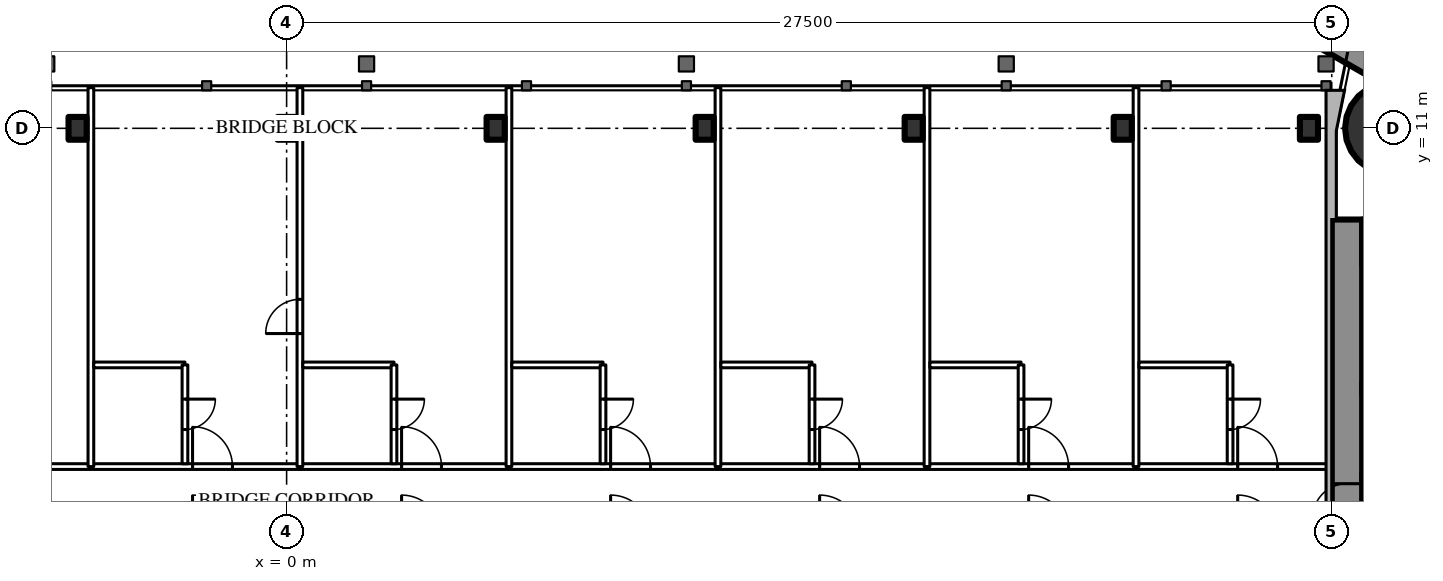
"""IFC4 building model, lengths in metres.
Left out: names, types, materials, properties, quantities, classifications, styles, units other than length and angle.
Written with IfcOpenShell. Run it as: python <this file> out.ifc"""

import sys

from ifc_helpers import new_model, si_unit, direction, frame, frame_2d, origin, origin_2d, place, context, subcontext, project, spatial, rectangle, circle, i_section, extrude, element, fill, save


model = new_model("IFC4")
c1 = context("Model", 3, precision=1e-05, world=origin(), true_north=direction((0.0, 1.0)))
c2 = subcontext(c1, "Body", "Model", "MODEL_VIEW")
j1 = project(units=[si_unit("LENGTHUNIT", "METRE"), si_unit("PLANEANGLEUNIT", "RADIAN")], contexts=[c1])
p1 = place(None, origin())
s1 = spatial("IfcSite", under=j1, at=p1, CompositionType="ELEMENT")
p2 = place(p1, origin())
s2 = spatial("IfcBuilding", under=s1, at=p2, CompositionType="ELEMENT")
p3 = place(p2, frame((0.0, 0.0, 222.5)))
s3 = spatial("IfcBuildingStorey", under=s2, at=p3, CompositionType="ELEMENT", Elevation=222.5)
p4 = place(p3, frame((29.05, 11.0, 0.0), z_axis=(0.0, 0.0, 1.0), x_axis=(1.0, 0.0, 0.0)))
e1 = element("IfcColumn", 1, at=p4, inside=s3, PredefinedType="COLUMN", context=c2, shape_type="SweptSolid", body=[
    extrude(circle(Radius=1.2, at=origin_2d()), origin(), (0.0, 0.0, 1.0), 3.6),
])
p5 = place(p3, frame((27.9, -8.6, 0.0), z_axis=(0.0, 0.0, 1.0), x_axis=(0.0, 1.0, 0.0)))
e2 = element("IfcWall", 2, at=p5, inside=s3, PredefinedType="SHEAR", context=c2, shape_type="SweptSolid", body=[
    extrude(rectangle(XDim=17.2, YDim=0.8, at=frame_2d((8.6, 0.0))), origin(), (0.0, 0.0, 1.0), 3.6),
])
p6 = place(p5, frame((9.35, 0.0, 0.0)))
e3 = element("IfcOpeningElement", 3, at=p6, cuts=e2, PredefinedType="OPENING", context=c2, shape_type="SweptSolid", body=[
    extrude(rectangle(XDim=0.9, YDim=2.2, at=frame_2d((0.45, 1.1))), frame((0.0, 0.41, 0.0), z_axis=(0.0, -1.0, 0.0), x_axis=(1.0, 0.0, 0.0)), (0.0, 0.0, 1.0), 0.82),
])
p7 = place(p3, frame((28.3, 8.0, 0.0), z_axis=(0.0, 0.0, 1.0), x_axis=(1.0, 0.0, 0.0)))
e4 = element("IfcWall", 4, at=p7, inside=s3, PredefinedType="SHEAR", context=c2, shape_type="SweptSolid", body=[
    extrude(rectangle(XDim=8.4, YDim=1.2, at=frame_2d((4.2, 0.0))), origin(), (0.0, 0.0, 1.0), 3.6),
])
p8 = place(p7, frame((0.25, 0.0, 0.0)))
e5 = element("IfcOpeningElement", 5, at=p8, cuts=e4, PredefinedType="OPENING", context=c2, shape_type="SweptSolid", body=[
    extrude(rectangle(XDim=1.0, YDim=2.2, at=frame_2d((0.5, 1.1))), frame((0.0, 0.61, 0.0), z_axis=(0.0, -1.0, 0.0), x_axis=(1.0, 0.0, 0.0)), (0.0, 0.0, 1.0), 1.22),
])
p9 = place(p3, frame((28.3, 4.15, 0.0), z_axis=(0.0, 0.0, 1.0), x_axis=(1.0, 0.0, 0.0)))
e6 = element("IfcWall", 6, at=p9, inside=s3, PredefinedType="SHEAR", context=c2, shape_type="SweptSolid", body=[
    extrude(rectangle(XDim=8.4, YDim=0.3, at=frame_2d((4.2, 0.0))), origin(), (0.0, 0.0, 1.0), 3.6),
])
p10 = place(p3, frame((28.3, 1.775, 0.0), z_axis=(0.0, 0.0, 1.0), x_axis=(1.0, 0.0, 0.0)))
e7 = element("IfcWall", 7, at=p10, inside=s3, PredefinedType="SHEAR", context=c2, shape_type="SweptSolid", body=[
    extrude(rectangle(XDim=2.9, YDim=0.25, at=frame_2d((1.45, 0.0))), origin(), (0.0, 0.0, 1.0), 3.6),
])
p11 = place(p3, frame((27.2, 13.8, 0.0), z_axis=(0.0, 0.0, 1.0), x_axis=(0.866024515034, -0.500001539357, 0.0)))
e8 = element("IfcWall", 8, at=p11, inside=s3, PredefinedType="SHEAR", context=c2, shape_type="SweptSolid", body=[
    extrude(rectangle(XDim=26.907, YDim=1.2, at=frame_2d((13.454, 0.0))), origin(), (0.0, 0.0, 1.0), 3.6),
])
p12 = place(p11, frame((4.6, 0.0, 0.0)))
e9 = element("IfcOpeningElement", 9, at=p12, cuts=e8, PredefinedType="OPENING", context=c2, shape_type="SweptSolid", body=[
    extrude(rectangle(XDim=1.0, YDim=2.2, at=frame_2d((0.5, 1.1))), frame((0.0, 0.61, 0.0), z_axis=(0.0, -1.0, 0.0), x_axis=(1.0, 0.0, 0.0)), (0.0, 0.0, 1.0), 1.22),
])
p13 = place(p11, frame((13.395, 0.0, 0.0)))
e10 = element("IfcOpeningElement", 10, at=p13, cuts=e8, PredefinedType="OPENING", context=c2, shape_type="SweptSolid", body=[
    extrude(rectangle(XDim=1.8, YDim=2.2, at=frame_2d((0.9, 1.1))), frame((0.0, 0.61, 0.0), z_axis=(0.0, -1.0, 0.0), x_axis=(1.0, 0.0, 0.0)), (0.0, 0.0, 1.0), 1.22),
])
for number, where, z_axis, x_axis in (
    (11, (-5.5, 11.0, 0.0), (0.0, 0.0, 1.0), (1.0, 0.0, 0.0)),
    (12, (0.0, 11.0, 0.0), (0.0, 0.0, 1.0), (1.0, 0.0, 0.0)),
    (13, (5.5, 11.0, 0.0), (0.0, 0.0, 1.0), (1.0, 0.0, 0.0)),
    (14, (11.0, 11.0, 0.0), (0.0, 0.0, 1.0), (1.0, 0.0, 0.0)),
    (15, (16.5, 11.0, 0.0), (0.0, 0.0, 1.0), (1.0, 0.0, 0.0)),
    (16, (22.0, 11.0, 0.0), (0.0, 0.0, 1.0), (1.0, 0.0, 0.0)),
    (17, (26.9, 11.0, 0.0), (0.0, 0.0, 1.0), (1.0, 0.0, 0.0)),
):
    element("IfcColumn", number, at=place(p3, frame(where, z_axis=z_axis, x_axis=x_axis)), inside=s3, PredefinedType="COLUMN", context=c2, shape_type="SweptSolid", body=[
        extrude(i_section(OverallWidth=0.476, OverallDepth=0.6, WebThickness=0.1, FlangeThickness=0.14, FilletRadius=0.02, at=origin_2d()), origin(), (0.0, 0.0, 1.0), 3.6),
    ])
p14 = place(p3, frame((-27.5, 2.1, 0.0), z_axis=(0.0, 0.0, 1.0), x_axis=(1.0, 0.0, 0.0)))
e18 = element("IfcWall", 18, at=p14, inside=s3, PredefinedType="PARTITIONING", context=c2, shape_type="SweptSolid", body=[
    extrude(rectangle(XDim=55.0, YDim=0.15, at=frame_2d((27.5, 0.0))), origin(), (0.0, 0.0, 1.0), 3.4),
])
p15 = place(p14, frame((2.025, 0.0, 0.0)))
e19 = element("IfcOpeningElement", 19, at=p15, cuts=e18, PredefinedType="OPENING", context=c2, shape_type="SweptSolid", body=[
    extrude(rectangle(XDim=1.05, YDim=2.4, at=frame_2d((0.525, 1.2))), frame((0.0, 0.085, 0.0), z_axis=(0.0, -1.0, 0.0), x_axis=(1.0, 0.0, 0.0)), (0.0, 0.0, 1.0), 0.17),
])
p16 = place(p14, frame((8.525, 0.0, 0.0)))
e20 = element("IfcOpeningElement", 20, at=p16, cuts=e18, PredefinedType="OPENING", context=c2, shape_type="SweptSolid", body=[
    extrude(rectangle(XDim=1.05, YDim=2.4, at=frame_2d((0.525, 1.2))), frame((0.0, 0.085, 0.0), z_axis=(0.0, -1.0, 0.0), x_axis=(1.0, 0.0, 0.0)), (0.0, 0.0, 1.0), 0.17),
])
p17 = place(p14, frame((14.025, 0.0, 0.0)))
e21 = element("IfcOpeningElement", 21, at=p17, cuts=e18, PredefinedType="OPENING", context=c2, shape_type="SweptSolid", body=[
    extrude(rectangle(XDim=1.05, YDim=2.4, at=frame_2d((0.525, 1.2))), frame((0.0, 0.085, 0.0), z_axis=(0.0, -1.0, 0.0), x_axis=(1.0, 0.0, 0.0)), (0.0, 0.0, 1.0), 0.17),
])
p18 = place(p14, frame((19.525, 0.0, 0.0)))
e22 = element("IfcOpeningElement", 22, at=p18, cuts=e18, PredefinedType="OPENING", context=c2, shape_type="SweptSolid", body=[
    extrude(rectangle(XDim=1.05, YDim=2.4, at=frame_2d((0.525, 1.2))), frame((0.0, 0.085, 0.0), z_axis=(0.0, -1.0, 0.0), x_axis=(1.0, 0.0, 0.0)), (0.0, 0.0, 1.0), 0.17),
])
p19 = place(p14, frame((25.025, 0.0, 0.0)))
e23 = element("IfcOpeningElement", 23, at=p19, cuts=e18, PredefinedType="OPENING", context=c2, shape_type="SweptSolid", body=[
    extrude(rectangle(XDim=1.05, YDim=2.4, at=frame_2d((0.525, 1.2))), frame((0.0, 0.085, 0.0), z_axis=(0.0, -1.0, 0.0), x_axis=(1.0, 0.0, 0.0)), (0.0, 0.0, 1.0), 0.17),
])
p20 = place(p14, frame((30.525, 0.0, 0.0)))
e24 = element("IfcOpeningElement", 24, at=p20, cuts=e18, PredefinedType="OPENING", context=c2, shape_type="SweptSolid", body=[
    extrude(rectangle(XDim=1.05, YDim=2.4, at=frame_2d((0.525, 1.2))), frame((0.0, 0.085, 0.0), z_axis=(0.0, -1.0, 0.0), x_axis=(1.0, 0.0, 0.0)), (0.0, 0.0, 1.0), 0.17),
])
p21 = place(p14, frame((36.025, 0.0, 0.0)))
e25 = element("IfcOpeningElement", 25, at=p21, cuts=e18, PredefinedType="OPENING", context=c2, shape_type="SweptSolid", body=[
    extrude(rectangle(XDim=1.05, YDim=2.4, at=frame_2d((0.525, 1.2))), frame((0.0, 0.085, 0.0), z_axis=(0.0, -1.0, 0.0), x_axis=(1.0, 0.0, 0.0)), (0.0, 0.0, 1.0), 0.17),
])
p22 = place(p14, frame((41.525, 0.0, 0.0)))
e26 = element("IfcOpeningElement", 26, at=p22, cuts=e18, PredefinedType="OPENING", context=c2, shape_type="SweptSolid", body=[
    extrude(rectangle(XDim=1.05, YDim=2.4, at=frame_2d((0.525, 1.2))), frame((0.0, 0.085, 0.0), z_axis=(0.0, -1.0, 0.0), x_axis=(1.0, 0.0, 0.0)), (0.0, 0.0, 1.0), 0.17),
])
p23 = place(p14, frame((47.025, 0.0, 0.0)))
e27 = element("IfcOpeningElement", 27, at=p23, cuts=e18, PredefinedType="OPENING", context=c2, shape_type="SweptSolid", body=[
    extrude(rectangle(XDim=1.05, YDim=2.4, at=frame_2d((0.525, 1.2))), frame((0.0, 0.085, 0.0), z_axis=(0.0, -1.0, 0.0), x_axis=(1.0, 0.0, 0.0)), (0.0, 0.0, 1.0), 0.17),
])
p24 = place(p14, frame((52.525, 0.0, 0.0)))
e28 = element("IfcOpeningElement", 28, at=p24, cuts=e18, PredefinedType="OPENING", context=c2, shape_type="SweptSolid", body=[
    extrude(rectangle(XDim=1.05, YDim=2.4, at=frame_2d((0.525, 1.2))), frame((0.0, 0.085, 0.0), z_axis=(0.0, -1.0, 0.0), x_axis=(1.0, 0.0, 0.0)), (0.0, 0.0, 1.0), 0.17),
])
p25 = place(p3, frame((-5.15, 2.1, 0.0), z_axis=(0.0, 0.0, 1.0), x_axis=(0.0, 1.0, 0.0)))
e29 = element("IfcWall", 29, at=p25, inside=s3, PredefinedType="PARTITIONING", context=c2, shape_type="SweptSolid", body=[
    extrude(rectangle(XDim=9.97, YDim=0.15, at=frame_2d((4.985, 0.0))), origin(), (0.0, 0.0, 1.0), 3.4),
])
p26 = place(p3, frame((0.35, 2.1, 0.0), z_axis=(0.0, 0.0, 1.0), x_axis=(0.0, 1.0, 0.0)))
e30 = element("IfcWall", 30, at=p26, inside=s3, PredefinedType="PARTITIONING", context=c2, shape_type="SweptSolid", body=[
    extrude(rectangle(XDim=9.97, YDim=0.15, at=frame_2d((4.985, 0.0))), origin(), (0.0, 0.0, 1.0), 3.4),
])
p27 = place(p26, frame((3.5, 0.0, 0.0)))
e31 = element("IfcOpeningElement", 31, at=p27, cuts=e30, PredefinedType="OPENING", context=c2, shape_type="SweptSolid", body=[
    extrude(rectangle(XDim=0.9, YDim=2.2, at=frame_2d((0.45, 1.1))), frame((0.0, 0.085, 0.0), z_axis=(0.0, -1.0, 0.0), x_axis=(1.0, 0.0, 0.0)), (0.0, 0.0, 1.0), 0.17),
])
for number, where, z_axis, x_axis in (
    (32, (5.85, 2.1, 0.0), (0.0, 0.0, 1.0), (0.0, 1.0, 0.0)),
    (33, (11.35, 2.1, 0.0), (0.0, 0.0, 1.0), (0.0, 1.0, 0.0)),
    (34, (16.85, 2.1, 0.0), (0.0, 0.0, 1.0), (0.0, 1.0, 0.0)),
    (35, (22.35, 2.1, 0.0), (0.0, 0.0, 1.0), (0.0, 1.0, 0.0)),
):
    element("IfcWall", number, at=place(p3, frame(where, z_axis=z_axis, x_axis=x_axis)), inside=s3, PredefinedType="PARTITIONING", context=c2, shape_type="SweptSolid", body=[
        extrude(rectangle(XDim=9.97, YDim=0.15, at=frame_2d((4.985, 0.0))), origin(), (0.0, 0.0, 1.0), 3.4),
    ])
p28 = place(p3, frame((-5.075, 4.775, 0.0), z_axis=(0.0, 0.0, 1.0), x_axis=(1.0, 0.0, 0.0)))
e36 = element("IfcWall", 36, at=p28, inside=s3, PredefinedType="PARTITIONING", context=c2, shape_type="SweptSolid", body=[
    extrude(rectangle(XDim=2.4, YDim=0.15, at=frame_2d((1.2, 0.0))), origin(), (0.0, 0.0, 1.0), 3.4),
])
p29 = place(p3, frame((-2.675, 2.175, 0.0), z_axis=(0.0, 0.0, 1.0), x_axis=(0.0, 1.0, 0.0)))
e37 = element("IfcWall", 37, at=p29, inside=s3, PredefinedType="PARTITIONING", context=c2, shape_type="SweptSolid", body=[
    extrude(rectangle(XDim=2.6, YDim=0.15, at=frame_2d((1.3, 0.0))), origin(), (0.0, 0.0, 1.0), 3.4),
])
p30 = place(p29, frame((0.9, 0.0, 0.0)))
e38 = element("IfcOpeningElement", 38, at=p30, cuts=e37, PredefinedType="OPENING", context=c2, shape_type="SweptSolid", body=[
    extrude(rectangle(XDim=0.8, YDim=2.2, at=frame_2d((0.4, 1.1))), frame((0.0, 0.085, 0.0), z_axis=(0.0, -1.0, 0.0), x_axis=(1.0, 0.0, 0.0)), (0.0, 0.0, 1.0), 0.17),
])
p31 = place(p3, frame((0.425, 4.775, 0.0), z_axis=(0.0, 0.0, 1.0), x_axis=(1.0, 0.0, 0.0)))
e39 = element("IfcWall", 39, at=p31, inside=s3, PredefinedType="PARTITIONING", context=c2, shape_type="SweptSolid", body=[
    extrude(rectangle(XDim=2.4, YDim=0.15, at=frame_2d((1.2, 0.0))), origin(), (0.0, 0.0, 1.0), 3.4),
])
p32 = place(p3, frame((2.825, 2.175, 0.0), z_axis=(0.0, 0.0, 1.0), x_axis=(0.0, 1.0, 0.0)))
e40 = element("IfcWall", 40, at=p32, inside=s3, PredefinedType="PARTITIONING", context=c2, shape_type="SweptSolid", body=[
    extrude(rectangle(XDim=2.6, YDim=0.15, at=frame_2d((1.3, 0.0))), origin(), (0.0, 0.0, 1.0), 3.4),
])
p33 = place(p32, frame((0.9, 0.0, 0.0)))
e41 = element("IfcOpeningElement", 41, at=p33, cuts=e40, PredefinedType="OPENING", context=c2, shape_type="SweptSolid", body=[
    extrude(rectangle(XDim=0.8, YDim=2.2, at=frame_2d((0.4, 1.1))), frame((0.0, 0.085, 0.0), z_axis=(0.0, -1.0, 0.0), x_axis=(1.0, 0.0, 0.0)), (0.0, 0.0, 1.0), 0.17),
])
p34 = place(p3, frame((5.925, 4.775, 0.0), z_axis=(0.0, 0.0, 1.0), x_axis=(1.0, 0.0, 0.0)))
e42 = element("IfcWall", 42, at=p34, inside=s3, PredefinedType="PARTITIONING", context=c2, shape_type="SweptSolid", body=[
    extrude(rectangle(XDim=2.4, YDim=0.15, at=frame_2d((1.2, 0.0))), origin(), (0.0, 0.0, 1.0), 3.4),
])
p35 = place(p3, frame((8.325, 2.175, 0.0), z_axis=(0.0, 0.0, 1.0), x_axis=(0.0, 1.0, 0.0)))
e43 = element("IfcWall", 43, at=p35, inside=s3, PredefinedType="PARTITIONING", context=c2, shape_type="SweptSolid", body=[
    extrude(rectangle(XDim=2.6, YDim=0.15, at=frame_2d((1.3, 0.0))), origin(), (0.0, 0.0, 1.0), 3.4),
])
p36 = place(p35, frame((0.9, 0.0, 0.0)))
e44 = element("IfcOpeningElement", 44, at=p36, cuts=e43, PredefinedType="OPENING", context=c2, shape_type="SweptSolid", body=[
    extrude(rectangle(XDim=0.8, YDim=2.2, at=frame_2d((0.4, 1.1))), frame((0.0, 0.085, 0.0), z_axis=(0.0, -1.0, 0.0), x_axis=(1.0, 0.0, 0.0)), (0.0, 0.0, 1.0), 0.17),
])
p37 = place(p3, frame((11.425, 4.775, 0.0), z_axis=(0.0, 0.0, 1.0), x_axis=(1.0, 0.0, 0.0)))
e45 = element("IfcWall", 45, at=p37, inside=s3, PredefinedType="PARTITIONING", context=c2, shape_type="SweptSolid", body=[
    extrude(rectangle(XDim=2.4, YDim=0.15, at=frame_2d((1.2, 0.0))), origin(), (0.0, 0.0, 1.0), 3.4),
])
p38 = place(p3, frame((13.825, 2.175, 0.0), z_axis=(0.0, 0.0, 1.0), x_axis=(0.0, 1.0, 0.0)))
e46 = element("IfcWall", 46, at=p38, inside=s3, PredefinedType="PARTITIONING", context=c2, shape_type="SweptSolid", body=[
    extrude(rectangle(XDim=2.6, YDim=0.15, at=frame_2d((1.3, 0.0))), origin(), (0.0, 0.0, 1.0), 3.4),
])
p39 = place(p38, frame((0.9, 0.0, 0.0)))
e47 = element("IfcOpeningElement", 47, at=p39, cuts=e46, PredefinedType="OPENING", context=c2, shape_type="SweptSolid", body=[
    extrude(rectangle(XDim=0.8, YDim=2.2, at=frame_2d((0.4, 1.1))), frame((0.0, 0.085, 0.0), z_axis=(0.0, -1.0, 0.0), x_axis=(1.0, 0.0, 0.0)), (0.0, 0.0, 1.0), 0.17),
])
p40 = place(p3, frame((16.925, 4.775, 0.0), z_axis=(0.0, 0.0, 1.0), x_axis=(1.0, 0.0, 0.0)))
e48 = element("IfcWall", 48, at=p40, inside=s3, PredefinedType="PARTITIONING", context=c2, shape_type="SweptSolid", body=[
    extrude(rectangle(XDim=2.4, YDim=0.15, at=frame_2d((1.2, 0.0))), origin(), (0.0, 0.0, 1.0), 3.4),
])
p41 = place(p3, frame((19.325, 2.175, 0.0), z_axis=(0.0, 0.0, 1.0), x_axis=(0.0, 1.0, 0.0)))
e49 = element("IfcWall", 49, at=p41, inside=s3, PredefinedType="PARTITIONING", context=c2, shape_type="SweptSolid", body=[
    extrude(rectangle(XDim=2.6, YDim=0.15, at=frame_2d((1.3, 0.0))), origin(), (0.0, 0.0, 1.0), 3.4),
])
p42 = place(p41, frame((0.9, 0.0, 0.0)))
e50 = element("IfcOpeningElement", 50, at=p42, cuts=e49, PredefinedType="OPENING", context=c2, shape_type="SweptSolid", body=[
    extrude(rectangle(XDim=0.8, YDim=2.2, at=frame_2d((0.4, 1.1))), frame((0.0, 0.085, 0.0), z_axis=(0.0, -1.0, 0.0), x_axis=(1.0, 0.0, 0.0)), (0.0, 0.0, 1.0), 0.17),
])
p43 = place(p3, frame((22.425, 4.775, 0.0), z_axis=(0.0, 0.0, 1.0), x_axis=(1.0, 0.0, 0.0)))
e51 = element("IfcWall", 51, at=p43, inside=s3, PredefinedType="PARTITIONING", context=c2, shape_type="SweptSolid", body=[
    extrude(rectangle(XDim=2.4, YDim=0.15, at=frame_2d((1.2, 0.0))), origin(), (0.0, 0.0, 1.0), 3.4),
])
p44 = place(p3, frame((24.825, 2.175, 0.0), z_axis=(0.0, 0.0, 1.0), x_axis=(0.0, 1.0, 0.0)))
e52 = element("IfcWall", 52, at=p44, inside=s3, PredefinedType="PARTITIONING", context=c2, shape_type="SweptSolid", body=[
    extrude(rectangle(XDim=2.6, YDim=0.15, at=frame_2d((1.3, 0.0))), origin(), (0.0, 0.0, 1.0), 3.4),
])
p45 = place(p44, frame((0.9, 0.0, 0.0)))
e53 = element("IfcOpeningElement", 53, at=p45, cuts=e52, PredefinedType="OPENING", context=c2, shape_type="SweptSolid", body=[
    extrude(rectangle(XDim=0.8, YDim=2.2, at=frame_2d((0.4, 1.1))), frame((0.0, 0.085, 0.0), z_axis=(0.0, -1.0, 0.0), x_axis=(1.0, 0.0, 0.0)), (0.0, 0.0, 1.0), 0.17),
])
p46 = place(p6, origin())
e54 = element("IfcDoor", 54, at=p46, inside=s3, OperationType="SINGLE_SWING_LEFT", PredefinedType="DOOR", context=c2, shape_type="SweptSolid", body=[
    extrude(rectangle(XDim=0.9, YDim=2.2, at=frame_2d((0.45, 1.1))), frame((0.0, 0.025, 0.0), z_axis=(0.0, -1.0, 0.0), x_axis=(1.0, 0.0, 0.0)), (0.0, 0.0, 1.0), 0.05),
])
fill(e3, e54)
p47 = place(p30, origin())
e55 = element("IfcDoor", 55, at=p47, inside=s3, OperationType="SINGLE_SWING_RIGHT", PredefinedType="DOOR", context=c2, shape_type="SweptSolid", body=[
    extrude(rectangle(XDim=0.8, YDim=2.2, at=frame_2d((0.4, 1.1))), frame((0.0, 0.025, 0.0), z_axis=(0.0, -1.0, 0.0), x_axis=(1.0, 0.0, 0.0)), (0.0, 0.0, 1.0), 0.05),
])
fill(e38, e55)
p48 = place(p19, origin())
e56 = element("IfcDoor", 56, at=p48, inside=s3, OperationType="SINGLE_SWING_LEFT", PredefinedType="DOOR", context=c2, shape_type="SweptSolid", body=[
    extrude(rectangle(XDim=1.05, YDim=2.4, at=frame_2d((0.525, 1.2))), frame((0.0, 0.025, 0.0), z_axis=(0.0, -1.0, 0.0), x_axis=(1.0, 0.0, 0.0)), (0.0, 0.0, 1.0), 0.05),
])
fill(e23, e56)
p49 = place(p33, origin())
e57 = element("IfcDoor", 57, at=p49, inside=s3, OperationType="SINGLE_SWING_RIGHT", PredefinedType="DOOR", context=c2, shape_type="SweptSolid", body=[
    extrude(rectangle(XDim=0.8, YDim=2.2, at=frame_2d((0.4, 1.1))), frame((0.0, 0.025, 0.0), z_axis=(0.0, -1.0, 0.0), x_axis=(1.0, 0.0, 0.0)), (0.0, 0.0, 1.0), 0.05),
])
fill(e41, e57)
p50 = place(p20, origin())
e58 = element("IfcDoor", 58, at=p50, inside=s3, OperationType="SINGLE_SWING_LEFT", PredefinedType="DOOR", context=c2, shape_type="SweptSolid", body=[
    extrude(rectangle(XDim=1.05, YDim=2.4, at=frame_2d((0.525, 1.2))), frame((0.0, 0.025, 0.0), z_axis=(0.0, -1.0, 0.0), x_axis=(1.0, 0.0, 0.0)), (0.0, 0.0, 1.0), 0.05),
])
fill(e24, e58)
p51 = place(p36, origin())
e59 = element("IfcDoor", 59, at=p51, inside=s3, OperationType="SINGLE_SWING_RIGHT", PredefinedType="DOOR", context=c2, shape_type="SweptSolid", body=[
    extrude(rectangle(XDim=0.8, YDim=2.2, at=frame_2d((0.4, 1.1))), frame((0.0, 0.025, 0.0), z_axis=(0.0, -1.0, 0.0), x_axis=(1.0, 0.0, 0.0)), (0.0, 0.0, 1.0), 0.05),
])
fill(e44, e59)
p52 = place(p21, origin())
e60 = element("IfcDoor", 60, at=p52, inside=s3, OperationType="SINGLE_SWING_LEFT", PredefinedType="DOOR", context=c2, shape_type="SweptSolid", body=[
    extrude(rectangle(XDim=1.05, YDim=2.4, at=frame_2d((0.525, 1.2))), frame((0.0, 0.025, 0.0), z_axis=(0.0, -1.0, 0.0), x_axis=(1.0, 0.0, 0.0)), (0.0, 0.0, 1.0), 0.05),
])
fill(e25, e60)
p53 = place(p39, origin())
e61 = element("IfcDoor", 61, at=p53, inside=s3, OperationType="SINGLE_SWING_RIGHT", PredefinedType="DOOR", context=c2, shape_type="SweptSolid", body=[
    extrude(rectangle(XDim=0.8, YDim=2.2, at=frame_2d((0.4, 1.1))), frame((0.0, 0.025, 0.0), z_axis=(0.0, -1.0, 0.0), x_axis=(1.0, 0.0, 0.0)), (0.0, 0.0, 1.0), 0.05),
])
fill(e47, e61)
p54 = place(p22, origin())
e62 = element("IfcDoor", 62, at=p54, inside=s3, OperationType="SINGLE_SWING_LEFT", PredefinedType="DOOR", context=c2, shape_type="SweptSolid", body=[
    extrude(rectangle(XDim=1.05, YDim=2.4, at=frame_2d((0.525, 1.2))), frame((0.0, 0.025, 0.0), z_axis=(0.0, -1.0, 0.0), x_axis=(1.0, 0.0, 0.0)), (0.0, 0.0, 1.0), 0.05),
])
fill(e26, e62)
p55 = place(p42, origin())
e63 = element("IfcDoor", 63, at=p55, inside=s3, OperationType="SINGLE_SWING_RIGHT", PredefinedType="DOOR", context=c2, shape_type="SweptSolid", body=[
    extrude(rectangle(XDim=0.8, YDim=2.2, at=frame_2d((0.4, 1.1))), frame((0.0, 0.025, 0.0), z_axis=(0.0, -1.0, 0.0), x_axis=(1.0, 0.0, 0.0)), (0.0, 0.0, 1.0), 0.05),
])
fill(e50, e63)
p56 = place(p23, origin())
e64 = element("IfcDoor", 64, at=p56, inside=s3, OperationType="SINGLE_SWING_LEFT", PredefinedType="DOOR", context=c2, shape_type="SweptSolid", body=[
    extrude(rectangle(XDim=1.05, YDim=2.4, at=frame_2d((0.525, 1.2))), frame((0.0, 0.025, 0.0), z_axis=(0.0, -1.0, 0.0), x_axis=(1.0, 0.0, 0.0)), (0.0, 0.0, 1.0), 0.05),
])
fill(e27, e64)
p57 = place(p45, origin())
e65 = element("IfcDoor", 65, at=p57, inside=s3, OperationType="SINGLE_SWING_RIGHT", PredefinedType="DOOR", context=c2, shape_type="SweptSolid", body=[
    extrude(rectangle(XDim=0.8, YDim=2.2, at=frame_2d((0.4, 1.1))), frame((0.0, 0.025, 0.0), z_axis=(0.0, -1.0, 0.0), x_axis=(1.0, 0.0, 0.0)), (0.0, 0.0, 1.0), 0.05),
])
fill(e53, e65)
p58 = place(p24, origin())
e66 = element("IfcDoor", 66, at=p58, inside=s3, OperationType="SINGLE_SWING_LEFT", PredefinedType="DOOR", context=c2, shape_type="SweptSolid", body=[
    extrude(rectangle(XDim=1.05, YDim=2.4, at=frame_2d((0.525, 1.2))), frame((0.0, 0.025, 0.0), z_axis=(0.0, -1.0, 0.0), x_axis=(1.0, 0.0, 0.0)), (0.0, 0.0, 1.0), 0.05),
])
fill(e28, e66)
p59 = place(p27, origin())
e67 = element("IfcDoor", 67, at=p59, inside=s3, OperationType="SINGLE_SWING_LEFT", PredefinedType="DOOR", context=c2, shape_type="SweptSolid", body=[
    extrude(rectangle(XDim=0.9, YDim=2.2, at=frame_2d((0.45, 1.1))), frame((0.0, 0.025, 0.0), z_axis=(0.0, -1.0, 0.0), x_axis=(1.0, 0.0, 0.0)), (0.0, 0.0, 1.0), 0.05),
])
fill(e31, e67)
save(model, sys.argv[1])
